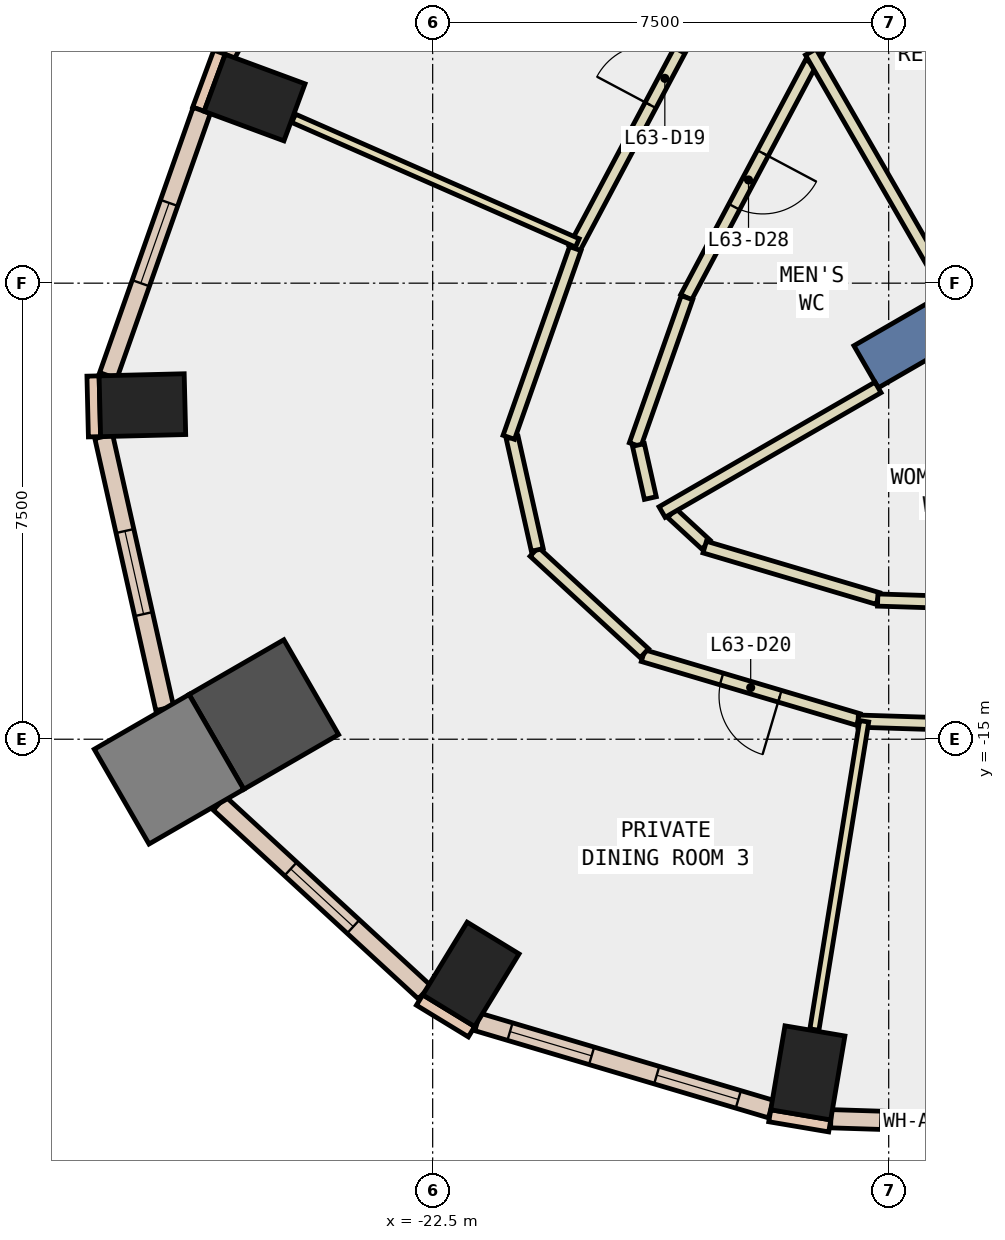
"""IFC4 building model, lengths in metres.
Left out: names, types, materials, properties, quantities, classifications, styles, units other than length and angle.
Written with IfcOpenShell. Run it as: python <this file> out.ifc"""

import sys

from ifc_helpers import new_model, si_unit, direction, frame, frame_2d, origin, origin_2d, place, context, subcontext, project, spatial, rectangle, extrude, element, fill, save


model = new_model("IFC4")
c1 = context("Model", 3, precision=1e-05, world=origin(), true_north=direction((0.0, 1.0)))
c2 = subcontext(c1, "Body", "Model", "MODEL_VIEW")
j1 = project(units=[si_unit("LENGTHUNIT", "METRE"), si_unit("PLANEANGLEUNIT", "RADIAN")], contexts=[c1])
p1 = place(None, origin())
s1 = spatial("IfcSite", under=j1, at=p1, CompositionType="ELEMENT")
p2 = place(p1, origin())
s2 = spatial("IfcBuilding", under=s1, at=p2, CompositionType="ELEMENT")
p3 = place(p2, frame((0.0, 0.0, 273.8)))
s3 = spatial("IfcBuildingStorey", under=s2, at=p3, CompositionType="ELEMENT", Elevation=273.8)
for number, where, z_axis, x_axis in (
    (1, (-16.33, -20.487, -0.34), (0.0, 0.0, 1.0), (-0.986, 0.167, 0.0)),
    (2, (-25.429, -4.448, -0.34), (0.0, 0.0, 1.0), (0.347, 0.938, 0.0)),
    (3, (-27.274, -9.507, -0.34), (0.0, 0.0, 1.0), (-0.025, 1.0, 0.0)),
):
    element("IfcColumn", number, at=place(p3, frame(where, z_axis=z_axis, x_axis=x_axis)), inside=s3, PredefinedType="COLUMN", context=c2, shape_type="SweptSolid", body=[
        extrude(rectangle(XDim=1.0, YDim=1.4, at=origin_2d()), origin(), (0.0, 0.0, 1.0), 3.6),
    ])
p4 = place(p3, frame((-25.277, -14.594, -0.34), z_axis=(0.0, 0.0, 1.0), x_axis=(0.866025403784, 0.5, 0.0)))
e4 = element("IfcColumn", 4, at=p4, inside=s3, PredefinedType="COLUMN", context=c2, shape_type="SweptSolid", body=[
    extrude(rectangle(XDim=1.8, YDim=1.8, at=origin_2d()), origin(), (0.0, 0.0, 1.0), 3.6),
])
p5 = place(p3, frame((-21.871, -18.867, -0.34), z_axis=(0.0, 0.0, 1.0), x_axis=(-0.853341581839, 0.521352227103, 0.0)))
e5 = element("IfcColumn", 5, at=p5, inside=s3, PredefinedType="COLUMN", context=c2, shape_type="SweptSolid", body=[
    extrude(rectangle(XDim=1.0, YDim=1.4, at=origin_2d()), origin(), (0.0, 0.0, 1.0), 3.6),
])
p6 = place(p3, frame((-26.836, -15.494, -0.34), z_axis=(0.0, 0.0, 1.0), x_axis=(0.866025403784, 0.5, 0.0)))
e6 = element("IfcColumn", 6, at=p6, inside=s3, PredefinedType="COLUMN", context=c2, shape_type="SweptSolid", body=[
    extrude(rectangle(XDim=1.8, YDim=1.8, at=origin_2d()), origin(), (0.0, 0.0, 1.0), 3.6),
])
p7 = place(p3, frame((-7.578, -4.375, -0.34), z_axis=(0.0, 0.0, 1.0), x_axis=(-0.866024315419, -0.5000018851, 0.0)))
e7 = element("IfcWall", 7, at=p7, inside=s3, PredefinedType="SHEAR", context=c2, shape_type="SweptSolid", body=[
    extrude(rectangle(XDim=9.0, YDim=0.8, at=frame_2d((4.5, 0.0))), origin(), (0.0, 0.0, 1.0), 3.6),
])
p8 = place(p3, frame((-26.006, -3.702, 0.0), z_axis=(0.0, 0.0, 1.0), x_axis=(-0.346892928577, -0.937904737222, 0.0)))
e8 = element("IfcWall", 8, at=p8, inside=s3, PredefinedType="STANDARD", context=c2, shape_type="SweptSolid", body=[
    extrude(rectangle(XDim=1.0, YDim=0.2, at=frame_2d((0.5, 0.0))), origin(), (0.0, 0.0, 1.0), 3.26),
])
p9 = place(p3, frame((-16.956, -21.192, 0.0), z_axis=(0.0, 0.0, 1.0), x_axis=(0.985961725342, -0.166971483074, 0.0)))
e9 = element("IfcWall", 9, at=p9, inside=s3, PredefinedType="STANDARD", context=c2, shape_type="SweptSolid", body=[
    extrude(rectangle(XDim=1.0, YDim=0.2, at=frame_2d((0.5, 0.0))), origin(), (0.0, 0.0, 1.0), 3.26),
])
p10 = place(p3, frame((-28.086, -9.027, 0.0), z_axis=(0.0, 0.0, 1.0), x_axis=(0.023948152966, -0.999713201858, 0.0)))
e10 = element("IfcWall", 10, at=p10, inside=s3, PredefinedType="STANDARD", context=c2, shape_type="SweptSolid", body=[
    extrude(rectangle(XDim=0.999, YDim=0.2, at=frame_2d((0.5, 0.0))), origin(), (0.0, 0.0, 1.0), 3.26),
])
p11 = place(p3, frame((-22.715, -19.289, 0.0), z_axis=(0.0, 0.0, 1.0), x_axis=(0.853679739553, -0.520798331677, 0.0)))
e11 = element("IfcWall", 11, at=p11, inside=s3, PredefinedType="STANDARD", context=c2, shape_type="SweptSolid", body=[
    extrude(rectangle(XDim=1.0, YDim=0.2, at=frame_2d((0.5, 0.0))), origin(), (0.0, 0.0, 1.0), 3.26),
])
p12 = place(p3, frame((-15.951, -21.241, 0.0), z_axis=(0.0, 0.0, 1.0), x_axis=(0.999496876383, -0.031717410046, 0.0)))
e12 = element("IfcWall", 12, at=p12, inside=s3, PredefinedType="STANDARD", context=c2, shape_type="SweptSolid", body=[
    extrude(rectangle(XDim=7.659, YDim=0.3, at=frame_2d((3.83, 0.0))), origin(), (0.0, 0.0, 1.0), 3.26),
])
p13 = place(p12, frame((0.815, 0.0, 0.9)))
e13 = element("IfcOpeningElement", 13, at=p13, cuts=e12, PredefinedType="OPENING", context=c2, shape_type="SweptSolid", body=[
    extrude(rectangle(XDim=2.2, YDim=2.0, at=frame_2d((1.1, 1.0))), frame((0.0, 0.16, 0.0), z_axis=(0.0, -1.0, 0.0), x_axis=(1.0, 0.0, 0.0)), (0.0, 0.0, 1.0), 0.32),
])
p14 = place(p12, frame((4.644, 0.0, 0.9)))
e14 = element("IfcOpeningElement", 14, at=p14, cuts=e12, PredefinedType="OPENING", context=c2, shape_type="SweptSolid", body=[
    extrude(rectangle(XDim=2.2, YDim=2.0, at=frame_2d((1.1, 1.0))), frame((0.0, 0.16, 0.0), z_axis=(0.0, -1.0, 0.0), x_axis=(1.0, 0.0, 0.0)), (0.0, 0.0, 1.0), 0.32),
])
p15 = place(p3, frame((-23.186, 1.348, 0.0), z_axis=(0.0, 0.0, 1.0), x_axis=(-0.469691596427, -0.882830563724, 0.0)))
e15 = element("IfcWall", 15, at=p15, inside=s3, PredefinedType="STANDARD", context=c2, shape_type="SweptSolid", body=[
    extrude(rectangle(XDim=5.768, YDim=0.3, at=frame_2d((2.884, 0.0))), origin(), (0.0, 0.0, 1.0), 3.26),
])
p16 = place(p15, frame((0.492, 0.0, 0.9)))
e16 = element("IfcOpeningElement", 16, at=p16, cuts=e15, PredefinedType="OPENING", context=c2, shape_type="SweptSolid", body=[
    extrude(rectangle(XDim=1.9, YDim=2.0, at=frame_2d((0.95, 1.0))), frame((0.0, 0.16, 0.0), z_axis=(0.0, -1.0, 0.0), x_axis=(1.0, 0.0, 0.0)), (0.0, 0.0, 1.0), 0.32),
])
p17 = place(p15, frame((3.376, 0.0, 0.9)))
e17 = element("IfcOpeningElement", 17, at=p17, cuts=e15, PredefinedType="OPENING", context=c2, shape_type="SweptSolid", body=[
    extrude(rectangle(XDim=1.9, YDim=2.0, at=frame_2d((0.95, 1.0))), frame((0.0, 0.16, 0.0), z_axis=(0.0, -1.0, 0.0), x_axis=(1.0, 0.0, 0.0)), (0.0, 0.0, 1.0), 0.32),
])
p18 = place(p3, frame((-26.298, -4.659, 0.0), z_axis=(0.0, 0.0, 1.0), x_axis=(-0.332491532378, -0.943106240514, 0.0)))
e18 = element("IfcWall", 18, at=p18, inside=s3, PredefinedType="STANDARD", context=c2, shape_type="SweptSolid", body=[
    extrude(rectangle(XDim=4.625, YDim=0.3, at=frame_2d((2.312, 0.0))), origin(), (0.0, 0.0, 1.0), 3.26),
])
p19 = place(p18, frame((1.613, 0.0, 0.9)))
e19 = element("IfcOpeningElement", 19, at=p19, cuts=e18, PredefinedType="OPENING", context=c2, shape_type="SweptSolid", body=[
    extrude(rectangle(XDim=1.4, YDim=2.0, at=frame_2d((0.7, 1.0))), frame((0.0, 0.16, 0.0), z_axis=(0.0, -1.0, 0.0), x_axis=(1.0, 0.0, 0.0)), (0.0, 0.0, 1.0), 0.32),
])
p20 = place(p3, frame((-27.91, -10.022, 0.0), z_axis=(0.0, 0.0, 1.0), x_axis=(0.218936963279, -0.975739005119, 0.0)))
e20 = element("IfcWall", 20, at=p20, inside=s3, PredefinedType="STANDARD", context=c2, shape_type="SweptSolid", body=[
    extrude(rectangle(XDim=4.585, YDim=0.3, at=frame_2d((2.293, 0.0))), origin(), (0.0, 0.0, 1.0), 3.26),
])
p21 = place(p20, frame((1.593, 0.0, 0.9)))
e21 = element("IfcOpeningElement", 21, at=p21, cuts=e20, PredefinedType="OPENING", context=c2, shape_type="SweptSolid", body=[
    extrude(rectangle(XDim=1.4, YDim=2.0, at=frame_2d((0.7, 1.0))), frame((0.0, 0.16, 0.0), z_axis=(0.0, -1.0, 0.0), x_axis=(1.0, 0.0, 0.0)), (0.0, 0.0, 1.0), 0.32),
])
p22 = place(p3, frame((-26.007, -16.054, 0.0), z_axis=(0.0, 0.0, 1.0), x_axis=(0.735631679486, -0.677381747714, 0.0)))
e22 = element("IfcWall", 22, at=p22, inside=s3, PredefinedType="STANDARD", context=c2, shape_type="SweptSolid", body=[
    extrude(rectangle(XDim=4.585, YDim=0.3, at=frame_2d((2.292, 0.0))), origin(), (0.0, 0.0, 1.0), 3.26),
])
p23 = place(p22, frame((1.593, 0.0, 0.9)))
e23 = element("IfcOpeningElement", 23, at=p23, cuts=e22, PredefinedType="OPENING", context=c2, shape_type="SweptSolid", body=[
    extrude(rectangle(XDim=1.4, YDim=2.0, at=frame_2d((0.7, 1.0))), frame((0.0, 0.16, 0.0), z_axis=(0.0, -1.0, 0.0), x_axis=(1.0, 0.0, 0.0)), (0.0, 0.0, 1.0), 0.32),
])
p24 = place(p3, frame((-21.764, -19.649, 0.0), z_axis=(0.0, 0.0, 1.0), x_axis=(0.95864045837, -0.284619872067, 0.0)))
e24 = element("IfcWall", 24, at=p24, inside=s3, PredefinedType="STANDARD", context=c2, shape_type="SweptSolid", body=[
    extrude(rectangle(XDim=5.035, YDim=0.3, at=frame_2d((2.518, 0.0))), origin(), (0.0, 0.0, 1.0), 3.26),
])
p25 = place(p24, frame((0.559, 0.0, 0.9)))
e25 = element("IfcOpeningElement", 25, at=p25, cuts=e24, PredefinedType="OPENING", context=c2, shape_type="SweptSolid", body=[
    extrude(rectangle(XDim=1.4, YDim=2.0, at=frame_2d((0.7, 1.0))), frame((0.0, 0.16, 0.0), z_axis=(0.0, -1.0, 0.0), x_axis=(1.0, 0.0, 0.0)), (0.0, 0.0, 1.0), 0.32),
])
p26 = place(p24, frame((3.076, 0.0, 0.9)))
e26 = element("IfcOpeningElement", 26, at=p26, cuts=e24, PredefinedType="OPENING", context=c2, shape_type="SweptSolid", body=[
    extrude(rectangle(XDim=1.4, YDim=2.0, at=frame_2d((0.7, 1.0))), frame((0.0, 0.16, 0.0), z_axis=(0.0, -1.0, 0.0), x_axis=(1.0, 0.0, 0.0)), (0.0, 0.0, 1.0), 0.32),
])
p27 = place(p3, frame((-15.439, -2.293, 0.0), z_axis=(0.0, 0.0, 1.0), x_axis=(-0.469248780065, -0.883066012486, 0.0)))
e27 = element("IfcWall", 27, at=p27, inside=s3, PredefinedType="PARTITIONING", context=c2, shape_type="SweptSolid", body=[
    extrude(rectangle(XDim=1.59, YDim=0.2, at=frame_2d((0.795, 0.0))), origin(), (0.0, 0.0, 1.0), 3.26),
])
p28 = place(p3, frame((-16.279, -3.873, 0.0), z_axis=(0.0, 0.0, 1.0), x_axis=(-0.469587967357, -0.882885689608, 0.0)))
e28 = element("IfcWall", 28, at=p28, inside=s3, PredefinedType="PARTITIONING", context=c2, shape_type="SweptSolid", body=[
    extrude(rectangle(XDim=4.372, YDim=0.2, at=frame_2d((2.186, 0.0))), origin(), (0.0, 0.0, 1.0), 3.26),
])
p29 = place(p28, frame((1.686, 0.0, 0.0)))
e29 = element("IfcOpeningElement", 29, at=p29, cuts=e28, PredefinedType="OPENING", context=c2, shape_type="SweptSolid", body=[
    extrude(rectangle(XDim=1.0, YDim=2.1, at=frame_2d((0.5, 1.05))), frame((0.0, 0.11, 0.0), z_axis=(0.0, -1.0, 0.0), x_axis=(1.0, 0.0, 0.0)), (0.0, 0.0, 1.0), 0.22),
])
p30 = place(p3, frame((-18.318, -7.739, 0.0), z_axis=(0.0, 0.0, 1.0), x_axis=(-0.332486504777, -0.943108012977, 0.0)))
e30 = element("IfcWall", 30, at=p30, inside=s3, PredefinedType="PARTITIONING", context=c2, shape_type="SweptSolid", body=[
    extrude(rectangle(XDim=2.565, YDim=0.2, at=frame_2d((1.282, 0.0))), origin(), (0.0, 0.0, 1.0), 3.26),
])
p31 = place(p3, frame((-19.116, -10.161, 0.0), z_axis=(0.0, 0.0, 1.0), x_axis=(0.219096654714, -0.975703159723, 0.0)))
e31 = element("IfcWall", 31, at=p31, inside=s3, PredefinedType="PARTITIONING", context=c2, shape_type="SweptSolid", body=[
    extrude(rectangle(XDim=0.895, YDim=0.2, at=frame_2d((0.447, 0.0))), origin(), (0.0, 0.0, 1.0), 3.26),
])
p32 = place(p3, frame((-18.567, -11.282, 0.0), z_axis=(0.0, 0.0, 1.0), x_axis=(0.735218904444, -0.677829744514, 0.0)))
e32 = element("IfcWall", 32, at=p32, inside=s3, PredefinedType="PARTITIONING", context=c2, shape_type="SweptSolid", body=[
    extrude(rectangle(XDim=0.766, YDim=0.2, at=frame_2d((0.383, 0.0))), origin(), (0.0, 0.0, 1.0), 3.26),
])
p33 = place(p3, frame((-18.026, -11.84, 0.0), z_axis=(0.0, 0.0, 1.0), x_axis=(0.958629704259, -0.284656090947, 0.0)))
e33 = element("IfcWall", 33, at=p33, inside=s3, PredefinedType="PARTITIONING", context=c2, shape_type="SweptSolid", body=[
    extrude(rectangle(XDim=2.972, YDim=0.2, at=frame_2d((1.486, 0.0))), origin(), (0.0, 0.0, 1.0), 3.26),
])
p34 = place(p3, frame((-15.181, -12.711, 0.0), z_axis=(0.0, 0.0, 1.0), x_axis=(0.999491493959, -0.031886572471, 0.0)))
e34 = element("IfcWall", 34, at=p34, inside=s3, PredefinedType="PARTITIONING", context=c2, shape_type="SweptSolid", body=[
    extrude(rectangle(XDim=4.081, YDim=0.2, at=frame_2d((2.041, 0.0))), origin(), (0.0, 0.0, 1.0), 3.26),
])
p35 = place(p34, frame((1.541, 0.0, 0.0)))
e35 = element("IfcOpeningElement", 35, at=p35, cuts=e34, PredefinedType="OPENING", context=c2, shape_type="SweptSolid", body=[
    extrude(rectangle(XDim=1.0, YDim=2.1, at=frame_2d((0.5, 1.05))), frame((0.0, 0.11, 0.0), z_axis=(0.0, -1.0, 0.0), x_axis=(1.0, 0.0, 0.0)), (0.0, 0.0, 1.0), 0.22),
])
p36 = place(p3, frame((-20.168, -6.926, 0.0), z_axis=(0.0, 0.0, 1.0), x_axis=(0.469552838911, 0.882904372778, 0.0)))
e36 = element("IfcWall", 36, at=p36, inside=s3, PredefinedType="PARTITIONING", context=c2, shape_type="SweptSolid", body=[
    extrude(rectangle(XDim=6.329, YDim=0.2, at=frame_2d((3.165, 0.0))), origin(), (0.0, 0.0, 1.0), 3.26),
])
p37 = place(p36, frame((2.665, 0.0, 0.0)))
e37 = element("IfcOpeningElement", 37, at=p37, cuts=e36, PredefinedType="OPENING", context=c2, shape_type="SweptSolid", body=[
    extrude(rectangle(XDim=1.0, YDim=2.1, at=frame_2d((0.5, 1.05))), frame((0.0, 0.11, 0.0), z_axis=(0.0, -1.0, 0.0), x_axis=(1.0, 0.0, 0.0)), (0.0, 0.0, 1.0), 0.22),
])
p38 = place(p3, frame((-15.499, -14.676, 0.0), z_axis=(0.0, 0.0, 1.0), x_axis=(-0.958734738219, 0.284302131073, 0.0)))
e38 = element("IfcWall", 38, at=p38, inside=s3, PredefinedType="PARTITIONING", context=c2, shape_type="SweptSolid", body=[
    extrude(rectangle(XDim=3.693, YDim=0.2, at=frame_2d((1.847, 0.0))), origin(), (0.0, 0.0, 1.0), 3.26),
])
p39 = place(p38, frame((1.347, 0.0, 0.0)))
e39 = element("IfcOpeningElement", 39, at=p39, cuts=e38, PredefinedType="OPENING", context=c2, shape_type="SweptSolid", body=[
    extrude(rectangle(XDim=1.0, YDim=2.1, at=frame_2d((0.5, 1.05))), frame((0.0, 0.11, 0.0), z_axis=(0.0, -1.0, 0.0), x_axis=(1.0, 0.0, 0.0)), (0.0, 0.0, 1.0), 0.22),
])
p40 = place(p3, frame((-19.018, -13.586, 0.0), z_axis=(0.0, 0.0, 1.0), x_axis=(-0.735547704352, 0.67747293276, 0.0)))
e40 = element("IfcWall", 40, at=p40, inside=s3, PredefinedType="PARTITIONING", context=c2, shape_type="SweptSolid", body=[
    extrude(rectangle(XDim=2.463, YDim=0.2, at=frame_2d((1.232, 0.0))), origin(), (0.0, 0.0, 1.0), 3.26),
])
p41 = place(p3, frame((-20.779, -11.887, 0.0), z_axis=(0.0, 0.0, 1.0), x_axis=(-0.218540107266, 0.975827967173, 0.0)))
e41 = element("IfcWall", 41, at=p41, inside=s3, PredefinedType="PARTITIONING", context=c2, shape_type="SweptSolid", body=[
    extrude(rectangle(XDim=1.895, YDim=0.2, at=frame_2d((0.947, 0.0))), origin(), (0.0, 0.0, 1.0), 3.26),
])
p42 = place(p3, frame((-21.248, -10.035, 0.0), z_axis=(0.0, 0.0, 1.0), x_axis=(0.332233916116, 0.943197023417, 0.0)))
e42 = element("IfcWall", 42, at=p42, inside=s3, PredefinedType="PARTITIONING", context=c2, shape_type="SweptSolid", body=[
    extrude(rectangle(XDim=3.29, YDim=0.2, at=frame_2d((1.645, 0.0))), origin(), (0.0, 0.0, 1.0), 3.26),
])
p43 = place(p3, frame((-7.7, -14.95, 0.0), z_axis=(0.0, 0.0, 1.0), x_axis=(-0.999495120537, 0.031772693047, 0.0)))
e43 = element("IfcWall", 43, at=p43, inside=s3, PredefinedType="PARTITIONING", context=c2, shape_type="SweptSolid", body=[
    extrude(rectangle(XDim=7.807, YDim=0.2, at=frame_2d((3.903, 0.0))), origin(), (0.0, 0.0, 1.0), 3.26),
])
p44 = place(p43, frame((3.403, 0.0, 0.0)))
e44 = element("IfcOpeningElement", 44, at=p44, cuts=e43, PredefinedType="OPENING", context=c2, shape_type="SweptSolid", body=[
    extrude(rectangle(XDim=1.0, YDim=2.1, at=frame_2d((0.5, 1.05))), frame((0.0, 0.11, 0.0), z_axis=(0.0, -1.0, 0.0), x_axis=(1.0, 0.0, 0.0)), (0.0, 0.0, 1.0), 0.22),
])
p45 = place(p3, frame((-14.079, -7.514, 0.0), z_axis=(0.0, 0.0, 1.0), x_axis=(-0.499959077901, 0.86604902888, 0.0)))
e45 = element("IfcWall", 45, at=p45, inside=s3, PredefinedType="PARTITIONING", context=c2, shape_type="SweptSolid", body=[
    extrude(rectangle(XDim=4.406, YDim=0.2, at=frame_2d((2.203, 0.0))), origin(), (0.0, 0.0, 1.0), 3.26),
])
p46 = place(p3, frame((-15.176, -9.214, 0.0), z_axis=(0.0, 0.0, 1.0), x_axis=(-0.86606561423, -0.499930346997, 0.0)))
e46 = element("IfcWall", 46, at=p46, inside=s3, PredefinedType="PARTITIONING", context=c2, shape_type="SweptSolid", body=[
    extrude(rectangle(XDim=4.1, YDim=0.2, at=frame_2d((2.05, 0.0))), origin(), (0.0, 0.0, 1.0), 3.26),
])
p47 = place(p3, frame((-20.121, -6.838, 0.0), z_axis=(0.0, 0.0, 1.0), x_axis=(-0.91561994307, 0.402044922679, 0.0)))
e47 = element("IfcWall", 47, at=p47, inside=s3, PredefinedType="PARTITIONING", context=c2, shape_type="SweptSolid", body=[
    extrude(rectangle(XDim=5.096, YDim=0.15, at=frame_2d((2.548, 0.0))), origin(), (0.0, 0.0, 1.0), 3.26),
])
p48 = place(p3, frame((-15.403, -14.705, 0.0), z_axis=(0.0, 0.0, 1.0), x_axis=(-0.159447664828, -0.98720638277, 0.0)))
e48 = element("IfcWall", 48, at=p48, inside=s3, PredefinedType="PARTITIONING", context=c2, shape_type="SweptSolid", body=[
    extrude(rectangle(XDim=5.135, YDim=0.15, at=frame_2d((2.568, 0.0))), origin(), (0.0, 0.0, 1.0), 3.26),
])
p49 = place(p13, origin())
e49 = element("IfcWindow", 49, at=p49, inside=s3, PartitioningType="SINGLE_PANEL", PredefinedType="WINDOW", context=c2, shape_type="SweptSolid", body=[
    extrude(rectangle(XDim=2.2, YDim=2.0, at=frame_2d((1.1, 1.0))), frame((0.0, 0.03, 0.0), z_axis=(0.0, -1.0, 0.0), x_axis=(1.0, 0.0, 0.0)), (0.0, 0.0, 1.0), 0.06),
])
fill(e13, e49)
p50 = place(p19, origin())
e50 = element("IfcWindow", 50, at=p50, inside=s3, PartitioningType="SINGLE_PANEL", PredefinedType="WINDOW", context=c2, shape_type="SweptSolid", body=[
    extrude(rectangle(XDim=1.4, YDim=2.0, at=frame_2d((0.7, 1.0))), frame((0.0, 0.03, 0.0), z_axis=(0.0, -1.0, 0.0), x_axis=(1.0, 0.0, 0.0)), (0.0, 0.0, 1.0), 0.06),
])
fill(e19, e50)
p51 = place(p21, origin())
e51 = element("IfcWindow", 51, at=p51, inside=s3, PartitioningType="SINGLE_PANEL", PredefinedType="WINDOW", context=c2, shape_type="SweptSolid", body=[
    extrude(rectangle(XDim=1.4, YDim=2.0, at=frame_2d((0.7, 1.0))), frame((0.0, 0.03, 0.0), z_axis=(0.0, -1.0, 0.0), x_axis=(1.0, 0.0, 0.0)), (0.0, 0.0, 1.0), 0.06),
])
fill(e21, e51)
p52 = place(p23, origin())
e52 = element("IfcWindow", 52, at=p52, inside=s3, PartitioningType="SINGLE_PANEL", PredefinedType="WINDOW", context=c2, shape_type="SweptSolid", body=[
    extrude(rectangle(XDim=1.4, YDim=2.0, at=frame_2d((0.7, 1.0))), frame((0.0, 0.03, 0.0), z_axis=(0.0, -1.0, 0.0), x_axis=(1.0, 0.0, 0.0)), (0.0, 0.0, 1.0), 0.06),
])
fill(e23, e52)
p53 = place(p25, origin())
e53 = element("IfcWindow", 53, at=p53, inside=s3, PartitioningType="SINGLE_PANEL", PredefinedType="WINDOW", context=c2, shape_type="SweptSolid", body=[
    extrude(rectangle(XDim=1.4, YDim=2.0, at=frame_2d((0.7, 1.0))), frame((0.0, 0.03, 0.0), z_axis=(0.0, -1.0, 0.0), x_axis=(1.0, 0.0, 0.0)), (0.0, 0.0, 1.0), 0.06),
])
fill(e25, e53)
p54 = place(p26, origin())
e54 = element("IfcWindow", 54, at=p54, inside=s3, PartitioningType="SINGLE_PANEL", PredefinedType="WINDOW", context=c2, shape_type="SweptSolid", body=[
    extrude(rectangle(XDim=1.4, YDim=2.0, at=frame_2d((0.7, 1.0))), frame((0.0, 0.03, 0.0), z_axis=(0.0, -1.0, 0.0), x_axis=(1.0, 0.0, 0.0)), (0.0, 0.0, 1.0), 0.06),
])
fill(e26, e54)
p55 = place(p37, origin())
e55 = element("IfcDoor", 55, at=p55, inside=s3, OperationType="SINGLE_SWING_LEFT", PredefinedType="DOOR", context=c2, shape_type="SweptSolid", body=[
    extrude(rectangle(XDim=1.0, YDim=2.1, at=frame_2d((0.5, 1.05))), frame((0.0, 0.025, 0.0), z_axis=(0.0, -1.0, 0.0), x_axis=(1.0, 0.0, 0.0)), (0.0, 0.0, 1.0), 0.05),
])
fill(e37, e55)
p56 = place(p39, origin())
e56 = element("IfcDoor", 56, at=p56, inside=s3, OperationType="SINGLE_SWING_LEFT", PredefinedType="DOOR", context=c2, shape_type="SweptSolid", body=[
    extrude(rectangle(XDim=1.0, YDim=2.1, at=frame_2d((0.5, 1.05))), frame((0.0, 0.025, 0.0), z_axis=(0.0, -1.0, 0.0), x_axis=(1.0, 0.0, 0.0)), (0.0, 0.0, 1.0), 0.05),
])
fill(e39, e56)
p57 = place(p29, origin())
e57 = element("IfcDoor", 57, at=p57, inside=s3, OperationType="SINGLE_SWING_LEFT", PredefinedType="DOOR", context=c2, shape_type="SweptSolid", body=[
    extrude(rectangle(XDim=1.0, YDim=2.1, at=frame_2d((0.5, 1.05))), frame((0.0, 0.025, 0.0), z_axis=(0.0, -1.0, 0.0), x_axis=(1.0, 0.0, 0.0)), (0.0, 0.0, 1.0), 0.05),
])
fill(e29, e57)
save(model, sys.argv[1])
